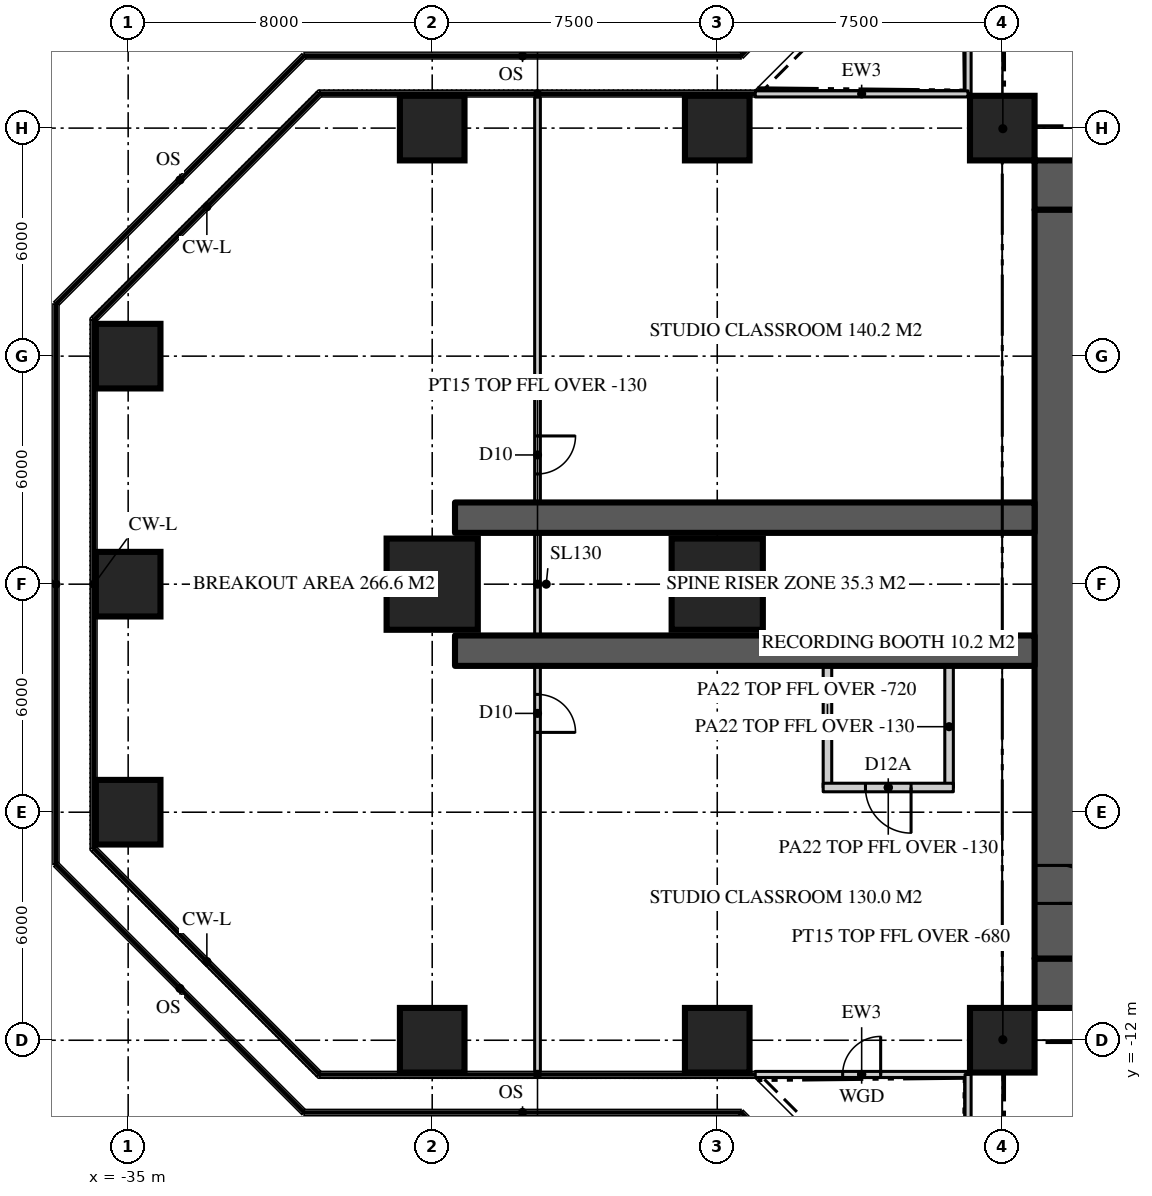
"""IFC4 building model, lengths in metres.
Left out: names, types, materials, properties, quantities, classifications, styles, units other than length and angle.
Written with IfcOpenShell. Run it as: python <this file> out.ifc"""

import sys

from ifc_helpers import new_model, si_unit, direction, frame, frame_2d, origin, origin_2d, place, context, subcontext, project, spatial, rectangle, extrude, element, fill, save


model = new_model("IFC4")
c1 = context("Model", 3, precision=1e-05, world=origin(), true_north=direction((0.0, 1.0)))
c2 = subcontext(c1, "Body", "Model", "MODEL_VIEW")
j1 = project(units=[si_unit("LENGTHUNIT", "METRE"), si_unit("PLANEANGLEUNIT", "RADIAN")], contexts=[c1])
p1 = place(None, origin())
s1 = spatial("IfcSite", under=j1, at=p1, CompositionType="ELEMENT")
p2 = place(p1, origin())
s2 = spatial("IfcBuilding", under=s1, at=p2, CompositionType="ELEMENT")
p3 = place(p2, frame((0.0, 0.0, 105.9)))
s3 = spatial("IfcBuildingStorey", under=s2, at=p3, CompositionType="ELEMENT", Elevation=105.9)
p4 = place(p3, frame((-11.15, 10.5, 0.0), z_axis=(0.0, 0.0, 1.0), x_axis=(1.0, 0.0, 0.0)))
e1 = element("IfcWall", 1, at=p4, inside=s3, PredefinedType="SHEAR", context=c2, shape_type="SweptSolid", body=[
    extrude(rectangle(XDim=22.3, YDim=1.3, at=frame_2d((11.15, 0.0))), origin(), (0.0, 0.0, 1.0), 3.9),
])
p5 = place(p4, frame((4.25, 0.0, 0.0)))
e2 = element("IfcOpeningElement", 2, at=p5, cuts=e1, PredefinedType="OPENING", context=c2, shape_type="SweptSolid", body=[
    extrude(rectangle(XDim=1.8, YDim=2.2, at=frame_2d((0.9, 1.1))), frame((0.0, 0.66, 0.0), z_axis=(0.0, -1.0, 0.0), x_axis=(1.0, 0.0, 0.0)), (0.0, 0.0, 1.0), 1.32),
])
p6 = place(p4, frame((16.25, 0.0, 0.0)))
e3 = element("IfcOpeningElement", 3, at=p6, cuts=e1, PredefinedType="OPENING", context=c2, shape_type="SweptSolid", body=[
    extrude(rectangle(XDim=1.8, YDim=2.2, at=frame_2d((0.9, 1.1))), frame((0.0, 0.66, 0.0), z_axis=(0.0, -1.0, 0.0), x_axis=(1.0, 0.0, 0.0)), (0.0, 0.0, 1.0), 1.32),
])
p7 = place(p3, frame((11.15, -10.5, 0.0), z_axis=(0.0, 0.0, 1.0), x_axis=(-1.0, 0.0, 0.0)))
e4 = element("IfcWall", 4, at=p7, inside=s3, PredefinedType="SHEAR", context=c2, shape_type="SweptSolid", body=[
    extrude(rectangle(XDim=22.3, YDim=1.3, at=frame_2d((11.15, 0.0))), origin(), (0.0, 0.0, 1.0), 3.9),
])
p8 = place(p7, frame((16.25, 0.0, 0.0)))
e5 = element("IfcOpeningElement", 5, at=p8, cuts=e4, PredefinedType="OPENING", context=c2, shape_type="SweptSolid", body=[
    extrude(rectangle(XDim=1.8, YDim=2.2, at=frame_2d((0.9, 1.1))), frame((0.0, 0.66, 0.0), z_axis=(0.0, -1.0, 0.0), x_axis=(1.0, 0.0, 0.0)), (0.0, 0.0, 1.0), 1.32),
])
p9 = place(p7, frame((4.25, 0.0, 0.0)))
e6 = element("IfcOpeningElement", 6, at=p9, cuts=e4, PredefinedType="OPENING", context=c2, shape_type="SweptSolid", body=[
    extrude(rectangle(XDim=1.8, YDim=2.2, at=frame_2d((0.9, 1.1))), frame((0.0, 0.66, 0.0), z_axis=(0.0, -1.0, 0.0), x_axis=(1.0, 0.0, 0.0)), (0.0, 0.0, 1.0), 1.32),
])
p10 = place(p3, frame((-10.5, 9.85, 0.0), z_axis=(0.0, 0.0, 1.0), x_axis=(0.0, -1.0, 0.0)))
e7 = element("IfcWall", 7, at=p10, inside=s3, PredefinedType="SHEAR", context=c2, shape_type="SweptSolid", body=[
    extrude(rectangle(XDim=19.7, YDim=1.3, at=frame_2d((9.85, 0.0))), origin(), (0.0, 0.0, 1.0), 3.9),
])
p11 = place(p10, frame((17.25, 0.0, 0.0)))
e8 = element("IfcOpeningElement", 8, at=p11, cuts=e7, PredefinedType="OPENING", context=c2, shape_type="SweptSolid", body=[
    extrude(rectangle(XDim=1.0, YDim=2.2, at=frame_2d((0.5, 1.1))), frame((0.0, 0.66, 0.0), z_axis=(0.0, -1.0, 0.0), x_axis=(1.0, 0.0, 0.0)), (0.0, 0.0, 1.0), 1.32),
])
for number, where, z_axis, x_axis in (
    (9, (-11.15, 1.75, 0.0), (0.0, 0.0, 1.0), (-1.0, 0.0, 0.0)),
    (10, (-11.15, -1.75, 0.0), (0.0, 0.0, 1.0), (-1.0, 0.0, 0.0)),
):
    element("IfcWall", number, at=place(p3, frame(where, z_axis=z_axis, x_axis=x_axis)), inside=s3, PredefinedType="SHEAR", context=c2, shape_type="SweptSolid", body=[
        extrude(rectangle(XDim=15.25, YDim=0.8, at=frame_2d((7.625, 0.0))), origin(), (0.0, 0.0, 1.0), 3.9),
    ])
for number, where, z_axis, x_axis in (
    (11, (-27.0, -12.0, 0.0), (0.0, 0.0, 1.0), (1.0, 0.0, 0.0)),
    (12, (-19.5, -12.0, 0.0), (0.0, 0.0, 1.0), (1.0, 0.0, 0.0)),
    (13, (-12.0, -12.0, 0.0), (0.0, 0.0, 1.0), (1.0, 0.0, 0.0)),
    (14, (-35.0, -6.0, 0.0), (0.0, 0.0, 1.0), (1.0, 0.0, 0.0)),
    (15, (-35.0, 0.0, 0.0), (0.0, 0.0, 1.0), (1.0, 0.0, 0.0)),
):
    element("IfcColumn", number, at=place(p3, frame(where, z_axis=z_axis, x_axis=x_axis)), inside=s3, PredefinedType="COLUMN", context=c2, shape_type="SweptSolid", body=[
        extrude(rectangle(XDim=1.7, YDim=1.7, at=origin_2d()), origin(), (0.0, 0.0, 1.0), 3.9),
    ])
for number, where, z_axis, x_axis in (
    (16, (-27.0, 0.0, 0.0), (0.0, 0.0, 1.0), (1.0, 0.0, 0.0)),
    (17, (-19.5, 0.0, 0.0), (0.0, 0.0, 1.0), (1.0, 0.0, 0.0)),
):
    element("IfcColumn", number, at=place(p3, frame(where, z_axis=z_axis, x_axis=x_axis)), inside=s3, PredefinedType="COLUMN", context=c2, shape_type="SweptSolid", body=[
        extrude(rectangle(XDim=2.4, YDim=2.4, at=origin_2d()), origin(), (0.0, 0.0, 1.0), 3.9),
    ])
for number, where, z_axis, x_axis in (
    (18, (-35.0, 6.0, 0.0), (0.0, 0.0, 1.0), (1.0, 0.0, 0.0)),
    (19, (-27.0, 12.0, 0.0), (0.0, 0.0, 1.0), (1.0, 0.0, 0.0)),
    (20, (-19.5, 12.0, 0.0), (0.0, 0.0, 1.0), (1.0, 0.0, 0.0)),
    (21, (-12.0, 12.0, 0.0), (0.0, 0.0, 1.0), (1.0, 0.0, 0.0)),
):
    element("IfcColumn", number, at=place(p3, frame(where, z_axis=z_axis, x_axis=x_axis)), inside=s3, PredefinedType="COLUMN", context=c2, shape_type="SweptSolid", body=[
        extrude(rectangle(XDim=1.7, YDim=1.7, at=origin_2d()), origin(), (0.0, 0.0, 1.0), 3.9),
    ])
p12 = place(p3, frame((-12.9, 18.5, 0.0), z_axis=(0.0, 0.0, 1.0), x_axis=(0.0, -1.0, 0.0)))
e22 = element("IfcWall", 22, at=p12, inside=s3, PredefinedType="SOLIDWALL", context=c2, shape_type="SweptSolid", body=[
    extrude(rectangle(XDim=5.6, YDim=0.16, at=frame_2d((2.8, 0.0))), origin(), (0.0, 0.0, 1.0), 3.77),
])
p13 = place(p12, frame((2.3, 0.0, 0.0)))
e23 = element("IfcOpeningElement", 23, at=p13, cuts=e22, PredefinedType="OPENING", context=c2, shape_type="SweptSolid", body=[
    extrude(rectangle(XDim=1.0, YDim=2.2, at=frame_2d((0.5, 1.1))), frame((0.0, 0.09, 0.0), z_axis=(0.0, -1.0, 0.0), x_axis=(1.0, 0.0, 0.0)), (0.0, 0.0, 1.0), 0.18),
])
p14 = place(p3, frame((-12.9, 12.9, 0.0), z_axis=(0.0, 0.0, 1.0), x_axis=(-1.0, 0.0, 0.0)))
e24 = element("IfcWall", 24, at=p14, inside=s3, PredefinedType="SOLIDWALL", context=c2, shape_type="SweptSolid", body=[
    extrude(rectangle(XDim=5.6, YDim=0.16, at=frame_2d((2.8, 0.0))), origin(), (0.0, 0.0, 1.0), 3.77),
])
p15 = place(p3, frame((-18.5, -12.9, 0.0), z_axis=(0.0, 0.0, 1.0), x_axis=(1.0, 0.0, 0.0)))
e25 = element("IfcWall", 25, at=p15, inside=s3, PredefinedType="SOLIDWALL", context=c2, shape_type="SweptSolid", body=[
    extrude(rectangle(XDim=5.6, YDim=0.16, at=frame_2d((2.8, 0.0))), origin(), (0.0, 0.0, 1.0), 3.77),
])
p16 = place(p15, frame((2.3, 0.0, 0.0)))
e26 = element("IfcOpeningElement", 26, at=p16, cuts=e25, PredefinedType="OPENING", context=c2, shape_type="SweptSolid", body=[
    extrude(rectangle(XDim=1.0, YDim=2.2, at=frame_2d((0.5, 1.1))), frame((0.0, 0.09, 0.0), z_axis=(0.0, -1.0, 0.0), x_axis=(1.0, 0.0, 0.0)), (0.0, 0.0, 1.0), 0.18),
])
p17 = place(p3, frame((-12.9, -12.9, 0.0), z_axis=(0.0, 0.0, 1.0), x_axis=(0.0, -1.0, 0.0)))
e27 = element("IfcWall", 27, at=p17, inside=s3, PredefinedType="SOLIDWALL", context=c2, shape_type="SweptSolid", body=[
    extrude(rectangle(XDim=5.6, YDim=0.16, at=frame_2d((2.8, 0.0))), origin(), (0.0, 0.0, 1.0), 3.77),
])
p18 = place(p3, frame((-24.229, 12.82, 0.0), z_axis=(0.0, 0.0, 1.0), x_axis=(0.0, -1.0, 0.0)))
e28 = element("IfcWall", 28, at=p18, inside=s3, PredefinedType="PARTITIONING", context=c2, shape_type="SweptSolid", body=[
    extrude(rectangle(XDim=25.64, YDim=0.15, at=frame_2d((12.82, 0.0))), origin(), (0.0, 0.0, 1.0), 3.77),
])
p19 = place(p18, frame((15.72, 0.0, 0.0)))
e29 = element("IfcOpeningElement", 29, at=p19, cuts=e28, PredefinedType="OPENING", context=c2, shape_type="SweptSolid", body=[
    extrude(rectangle(XDim=1.0, YDim=2.2, at=frame_2d((0.5, 1.1))), frame((0.0, 0.085, 0.0), z_axis=(0.0, -1.0, 0.0), x_axis=(1.0, 0.0, 0.0)), (0.0, 0.0, 1.0), 0.17),
])
p20 = place(p18, frame((8.92, 0.0, 0.0)))
e30 = element("IfcOpeningElement", 30, at=p20, cuts=e28, PredefinedType="OPENING", context=c2, shape_type="SweptSolid", body=[
    extrude(rectangle(XDim=1.0, YDim=2.2, at=frame_2d((0.5, 1.1))), frame((0.0, 0.085, 0.0), z_axis=(0.0, -1.0, 0.0), x_axis=(1.0, 0.0, 0.0)), (0.0, 0.0, 1.0), 0.17),
])
p21 = place(p3, frame((-13.4, -2.15, 0.0), z_axis=(0.0, 0.0, 1.0), x_axis=(0.0, -1.0, 0.0)))
e31 = element("IfcWall", 31, at=p21, inside=s3, PredefinedType="PARTITIONING", context=c2, shape_type="SweptSolid", body=[
    extrude(rectangle(XDim=3.2, YDim=0.225, at=frame_2d((1.6, 0.0))), origin(), (0.0, 0.0, 1.0), 3.77),
])
p22 = place(p3, frame((-16.6, -2.15, 0.0), z_axis=(0.0, 0.0, 1.0), x_axis=(0.0, -1.0, 0.0)))
e32 = element("IfcWall", 32, at=p22, inside=s3, PredefinedType="PARTITIONING", context=c2, shape_type="SweptSolid", body=[
    extrude(rectangle(XDim=3.2, YDim=0.225, at=frame_2d((1.6, 0.0))), origin(), (0.0, 0.0, 1.0), 3.18),
])
p23 = place(p3, frame((-13.288, -5.35, 0.0), z_axis=(0.0, 0.0, 1.0), x_axis=(-1.0, 0.0, 0.0)))
e33 = element("IfcWall", 33, at=p23, inside=s3, PredefinedType="PARTITIONING", context=c2, shape_type="SweptSolid", body=[
    extrude(rectangle(XDim=3.425, YDim=0.225, at=frame_2d((1.712, 0.0))), origin(), (0.0, 0.0, 1.0), 3.77),
])
p24 = place(p23, frame((1.113, 0.0, 0.0)))
e34 = element("IfcOpeningElement", 34, at=p24, cuts=e33, PredefinedType="OPENING", context=c2, shape_type="SweptSolid", body=[
    extrude(rectangle(XDim=1.2, YDim=2.2, at=frame_2d((0.6, 1.1))), frame((0.0, 0.123, 0.0), z_axis=(0.0, -1.0, 0.0), x_axis=(1.0, 0.0, 0.0)), (0.0, 0.0, 1.0), 0.245),
])
for number, where, z_axis, x_axis in (
    (35, (-11.15, 11.15, 0.0), (0.0, 0.0, 1.0), (-0.707, 0.707, 0.0)),
    (36, (-11.15, -11.15, 0.0), (0.0, 0.0, 1.0), (-0.707, -0.707, 0.0)),
):
    element("IfcWall", number, at=place(p3, frame(where, z_axis=z_axis, x_axis=x_axis)), inside=s3, PredefinedType="PARTITIONING", context=c2, shape_type="SweptSolid", body=[
        extrude(rectangle(XDim=2.362, YDim=0.15, at=frame_2d((1.181, 0.0))), origin(), (0.0, 0.0, 1.0), 3.22),
    ])
p25 = place(p16, origin())
e37 = element("IfcDoor", 37, at=p25, inside=s3, OperationType="SINGLE_SWING_RIGHT", PredefinedType="DOOR", context=c2, shape_type="SweptSolid", body=[
    extrude(rectangle(XDim=1.0, YDim=2.2, at=frame_2d((0.5, 1.1))), frame((0.0, 0.025, 0.0), z_axis=(0.0, -1.0, 0.0), x_axis=(1.0, 0.0, 0.0)), (0.0, 0.0, 1.0), 0.05),
])
fill(e26, e37)
p26 = place(p11, origin())
e38 = element("IfcDoor", 38, at=p26, inside=s3, OperationType="SINGLE_SWING_RIGHT", PredefinedType="DOOR", context=c2, shape_type="SweptSolid", body=[
    extrude(rectangle(XDim=1.0, YDim=2.2, at=frame_2d((0.5, 1.1))), frame((0.0, 0.025, 0.0), z_axis=(0.0, -1.0, 0.0), x_axis=(1.0, 0.0, 0.0)), (0.0, 0.0, 1.0), 0.05),
])
fill(e8, e38)
p27 = place(p19, origin())
e39 = element("IfcDoor", 39, at=p27, inside=s3, OperationType="SINGLE_SWING_RIGHT", PredefinedType="DOOR", context=c2, shape_type="SweptSolid", body=[
    extrude(rectangle(XDim=1.0, YDim=2.2, at=frame_2d((0.5, 1.1))), frame((0.0, 0.025, 0.0), z_axis=(0.0, -1.0, 0.0), x_axis=(1.0, 0.0, 0.0)), (0.0, 0.0, 1.0), 0.05),
])
fill(e29, e39)
p28 = place(p20, origin())
e40 = element("IfcDoor", 40, at=p28, inside=s3, OperationType="SINGLE_SWING_LEFT", PredefinedType="DOOR", context=c2, shape_type="SweptSolid", body=[
    extrude(rectangle(XDim=1.0, YDim=2.2, at=frame_2d((0.5, 1.1))), frame((0.0, 0.025, 0.0), z_axis=(0.0, -1.0, 0.0), x_axis=(1.0, 0.0, 0.0)), (0.0, 0.0, 1.0), 0.05),
])
fill(e30, e40)
p29 = place(p24, origin())
e41 = element("IfcDoor", 41, at=p29, inside=s3, OperationType="SINGLE_SWING_LEFT", PredefinedType="DOOR", context=c2, shape_type="SweptSolid", body=[
    extrude(rectangle(XDim=1.2, YDim=2.2, at=frame_2d((0.6, 1.1))), frame((0.0, 0.025, 0.0), z_axis=(0.0, -1.0, 0.0), x_axis=(1.0, 0.0, 0.0)), (0.0, 0.0, 1.0), 0.05),
])
fill(e34, e41)
save(model, sys.argv[1])
